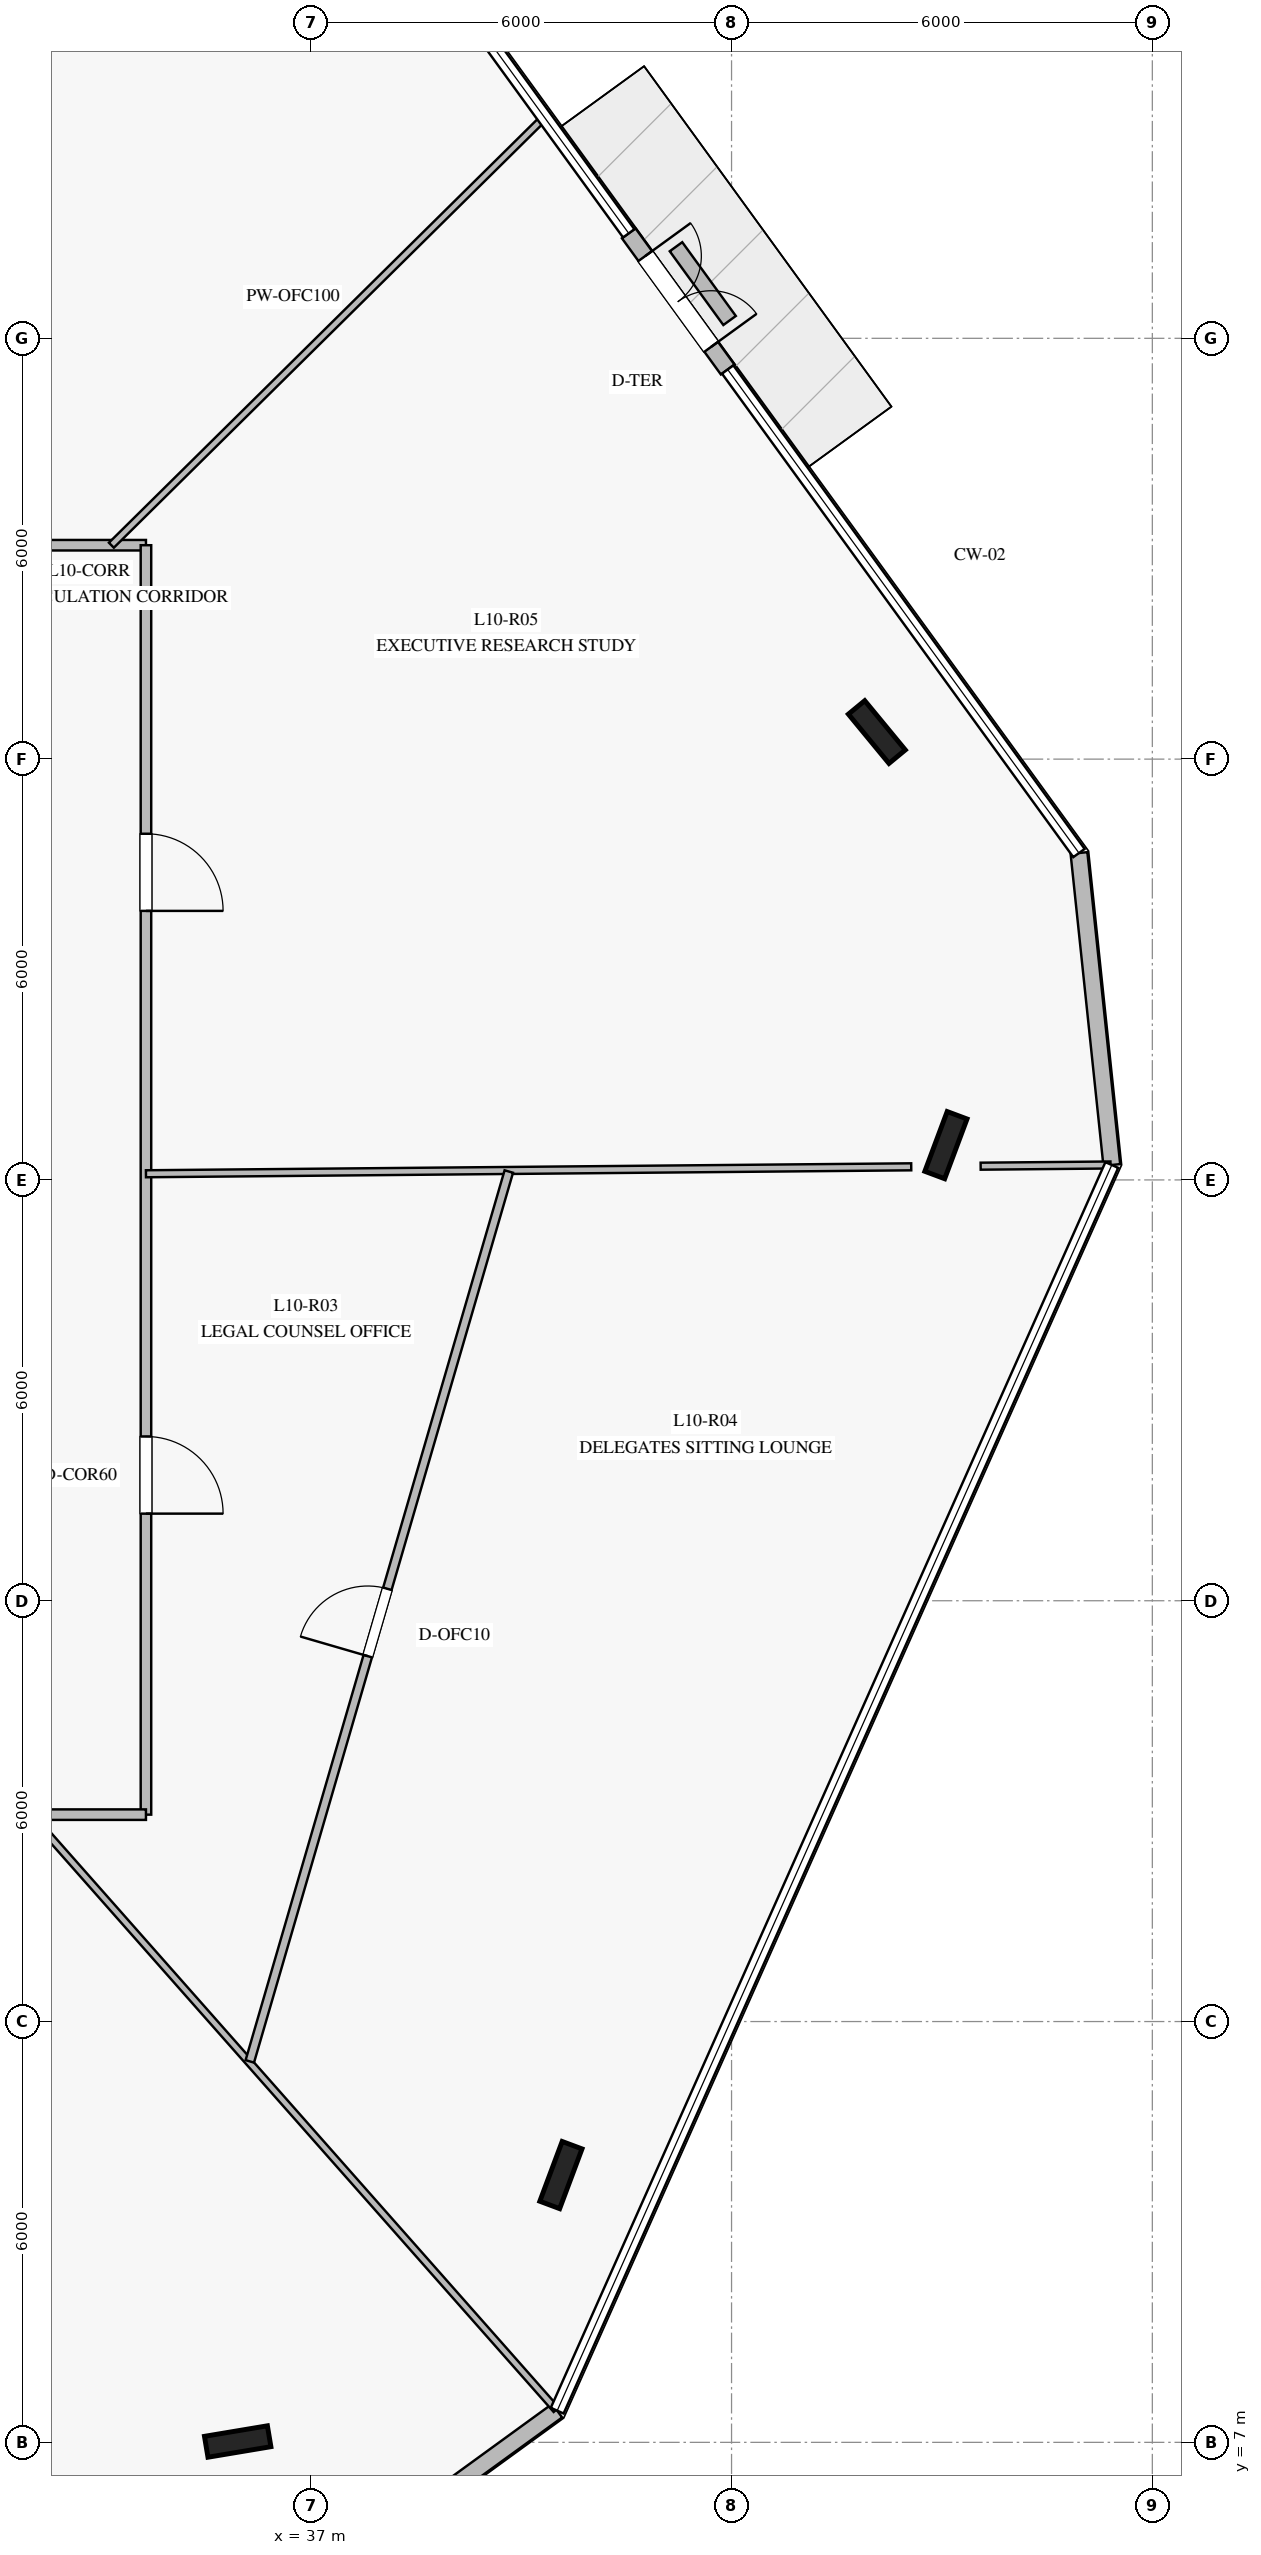
"""IFC4 building model, lengths in metres.
Left out: names, types, materials, properties, quantities, classifications, styles, units other than length and angle.
Written with IfcOpenShell. Run it as: python <this file> out.ifc"""

import sys

from ifc_helpers import new_model, si_unit, direction, frame, frame_2d, origin, origin_2d, place, context, subcontext, project, spatial, rectangle, i_section, extrude, element, fill, save


model = new_model("IFC4")
c1 = context("Model", 3, precision=1e-05, world=origin(), true_north=direction((0.0, 1.0)))
c2 = subcontext(c1, "Body", "Model", "MODEL_VIEW")
j1 = project(units=[si_unit("LENGTHUNIT", "METRE"), si_unit("PLANEANGLEUNIT", "RADIAN")], contexts=[c1])
p1 = place(None, origin())
s1 = spatial("IfcSite", under=j1, at=p1, CompositionType="ELEMENT")
p2 = place(p1, origin())
s2 = spatial("IfcBuilding", under=s1, at=p2, CompositionType="ELEMENT")
p3 = place(p2, frame((0.0, 0.0, 44.0)))
s3 = spatial("IfcBuildingStorey", under=s2, at=p3, CompositionType="ELEMENT", Elevation=44.0)
for number, where, z_axis, x_axis in (
    (1, (45.072, 31.386, 0.0), (0.0, 0.0, 1.0), (-0.636, 0.772, 0.0)),
    (2, (35.958, 7.012, 0.0), (0.0, 0.0, 1.0), (0.986, 0.165, 0.0)),
    (3, (40.567, 10.811, 0.0), (0.0, 0.0, 1.0), (0.35, 0.937, 0.0)),
    (4, (46.057, 25.496, 0.0), (0.0, 0.0, 1.0), (0.35, 0.937, 0.0)),
):
    element("IfcColumn", number, at=place(p3, frame(where, z_axis=z_axis, x_axis=x_axis)), inside=s3, PredefinedType="COLUMN", context=c2, shape_type="SweptSolid", body=[
        extrude(i_section(OverallWidth=0.302, OverallDepth=0.91, WebThickness=0.021, FlangeThickness=0.04, at=origin_2d()), origin(), (0.0, 0.0, 1.0), 4.0),
    ])
p4 = place(p3, frame((42.945, 36.555, 0.0), z_axis=(0.0, 0.0, 1.0), x_axis=(-0.587808827466, 0.808999865484, 0.0)))
e5 = element("IfcWall", 5, at=p4, inside=s3, PredefinedType="STANDARD", context=c2, shape_type="SweptSolid", body=[
    extrude(rectangle(XDim=2.401, YDim=0.24, at=frame_2d((1.2, 0.0))), origin(), (0.0, 0.0, 1.0), 3.76),
])
p5 = place(p4, frame((0.4, 0.0, 0.0)))
e6 = element("IfcOpeningElement", 6, at=p5, cuts=e5, PredefinedType="OPENING", context=c2, shape_type="SweptSolid", body=[
    extrude(rectangle(XDim=1.6, YDim=2.25, at=frame_2d((0.8, 1.125))), frame((0.0, 0.13, 0.0), z_axis=(0.0, -1.0, 0.0), x_axis=(1.0, 0.0, 0.0)), (0.0, 0.0, 1.0), 0.26),
])
p6 = place(p3, frame((36.895, 4.823, 0.0), z_axis=(0.0, 0.0, 1.0), x_axis=(0.80905696026, 0.587730240038, 0.0)))
e7 = element("IfcWall", 7, at=p6, inside=s3, PredefinedType="STANDARD", context=c2, shape_type="SweptSolid", body=[
    extrude(rectangle(XDim=4.473, YDim=0.24, at=frame_2d((2.236, 0.0))), origin(), (0.0, 0.0, 1.0), 3.76),
])
p7 = place(p3, frame((48.422, 25.213, 0.0), z_axis=(0.0, 0.0, 1.0), x_axis=(-0.104642162151, 0.994509938563, 0.0)))
e8 = element("IfcWall", 8, at=p7, inside=s3, PredefinedType="STANDARD", context=c2, shape_type="SweptSolid", body=[
    extrude(rectangle(XDim=4.473, YDim=0.24, at=frame_2d((2.236, 0.0))), origin(), (0.0, 0.0, 1.0), 3.76),
])
p8 = place(p3, frame((42.972, 37.254, 0.0), z_axis=(0.0, 0.0, 1.0), x_axis=(-0.587579763197, 0.809166251076, 0.0)))
e9 = element("IfcWall", 9, at=p8, inside=s3, PredefinedType="USERDEFINED", context=c2, shape_type="SweptSolid", body=[
    extrude(rectangle(XDim=1.3, YDim=0.22, at=frame_2d((0.65, 0.0))), origin(), (0.0, 0.0, 1.0), 0.4),
])
p9 = place(p3, frame((15.35, 34.05, 0.0), z_axis=(0.0, 0.0, 1.0), x_axis=(1.0, 0.0, 0.0)))
e10 = element("IfcWall", 10, at=p9, inside=s3, PredefinedType="PARTITIONING", context=c2, shape_type="SweptSolid", body=[
    extrude(rectangle(XDim=19.3, YDim=0.15, at=frame_2d((9.65, 0.0))), origin(), (0.0, 0.0, 1.0), 3.21),
])
p10 = place(p9, frame((13.94, 0.0, 0.0)))
e11 = element("IfcOpeningElement", 11, at=p10, cuts=e10, PredefinedType="OPENING", context=c2, shape_type="SweptSolid", body=[
    extrude(rectangle(XDim=1.1, YDim=2.2, at=frame_2d((0.55, 1.1))), frame((0.0, 0.085, 0.0), z_axis=(0.0, -1.0, 0.0), x_axis=(1.0, 0.0, 0.0)), (0.0, 0.0, 1.0), 0.17),
])
p11 = place(p9, frame((4.582, 0.0, 0.0)))
e12 = element("IfcOpeningElement", 12, at=p11, cuts=e10, PredefinedType="OPENING", context=c2, shape_type="SweptSolid", body=[
    extrude(rectangle(XDim=1.1, YDim=2.2, at=frame_2d((0.55, 1.1))), frame((0.0, 0.085, 0.0), z_axis=(0.0, -1.0, 0.0), x_axis=(1.0, 0.0, 0.0)), (0.0, 0.0, 1.0), 0.17),
])
p12 = place(p3, frame((34.65, 34.05, 0.0), z_axis=(0.0, 0.0, 1.0), x_axis=(0.0, -1.0, 0.0)))
e13 = element("IfcWall", 13, at=p12, inside=s3, PredefinedType="PARTITIONING", context=c2, shape_type="SweptSolid", body=[
    extrude(rectangle(XDim=18.1, YDim=0.15, at=frame_2d((9.05, 0.0))), origin(), (0.0, 0.0, 1.0), 3.21),
])
p13 = place(p12, frame((12.708, 0.0, 0.0)))
e14 = element("IfcOpeningElement", 14, at=p13, cuts=e13, PredefinedType="OPENING", context=c2, shape_type="SweptSolid", body=[
    extrude(rectangle(XDim=1.1, YDim=2.2, at=frame_2d((0.55, 1.1))), frame((0.0, 0.085, 0.0), z_axis=(0.0, -1.0, 0.0), x_axis=(1.0, 0.0, 0.0)), (0.0, 0.0, 1.0), 0.17),
])
p14 = place(p12, frame((4.114, 0.0, 0.0)))
e15 = element("IfcOpeningElement", 15, at=p14, cuts=e13, PredefinedType="OPENING", context=c2, shape_type="SweptSolid", body=[
    extrude(rectangle(XDim=1.1, YDim=2.2, at=frame_2d((0.55, 1.1))), frame((0.0, 0.085, 0.0), z_axis=(0.0, -1.0, 0.0), x_axis=(1.0, 0.0, 0.0)), (0.0, 0.0, 1.0), 0.17),
])
p15 = place(p3, frame((34.65, 15.95, 0.0), z_axis=(0.0, 0.0, 1.0), x_axis=(-1.0, 0.0, 0.0)))
e16 = element("IfcWall", 16, at=p15, inside=s3, PredefinedType="PARTITIONING", context=c2, shape_type="SweptSolid", body=[
    extrude(rectangle(XDim=19.3, YDim=0.15, at=frame_2d((9.65, 0.0))), origin(), (0.0, 0.0, 1.0), 3.21),
])
p16 = place(p15, frame((15.181, 0.0, 0.0)))
e17 = element("IfcOpeningElement", 17, at=p16, cuts=e16, PredefinedType="OPENING", context=c2, shape_type="SweptSolid", body=[
    extrude(rectangle(XDim=1.1, YDim=2.2, at=frame_2d((0.55, 1.1))), frame((0.0, 0.085, 0.0), z_axis=(0.0, -1.0, 0.0), x_axis=(1.0, 0.0, 0.0)), (0.0, 0.0, 1.0), 0.17),
])
p17 = place(p15, frame((6.497, 0.0, 0.0)))
e18 = element("IfcOpeningElement", 18, at=p17, cuts=e16, PredefinedType="OPENING", context=c2, shape_type="SweptSolid", body=[
    extrude(rectangle(XDim=1.1, YDim=2.2, at=frame_2d((0.55, 1.1))), frame((0.0, 0.085, 0.0), z_axis=(0.0, -1.0, 0.0), x_axis=(1.0, 0.0, 0.0)), (0.0, 0.0, 1.0), 0.17),
])
p18 = place(p3, frame((34.157, 34.05, 0.0), z_axis=(0.0, 0.0, 1.0), x_axis=(0.711265132762, 0.702923830096, 0.0)))
e19 = element("IfcWall", 19, at=p18, inside=s3, PredefinedType="MOVABLE", context=c2, shape_type="SweptSolid", body=[
    extrude(rectangle(XDim=8.664, YDim=0.1, at=frame_2d((4.332, 0.0))), origin(), (0.0, 0.0, 1.0), 3.06),
])
p19 = place(p3, frame((33.001, 15.95, 0.0), z_axis=(0.0, 0.0, 1.0), x_axis=(0.662327291421, -0.749214628153, 0.0)))
e20 = element("IfcWall", 20, at=p19, inside=s3, PredefinedType="MOVABLE", context=c2, shape_type="SweptSolid", body=[
    extrude(rectangle(XDim=11.324, YDim=0.1, at=frame_2d((5.662, 0.0))), origin(), (0.0, 0.0, 1.0), 3.06),
])
p20 = place(p3, frame((34.65, 25.088, 0.0), z_axis=(0.0, 0.0, 1.0), x_axis=(0.999958746777, 0.009083212171, 0.0)))
e21 = element("IfcWall", 21, at=p20, inside=s3, PredefinedType="MOVABLE", context=c2, shape_type="SweptSolid", body=[
    extrude(rectangle(XDim=10.913, YDim=0.1, at=frame_2d((5.456, 0.0))), origin(), (0.0, 0.0, 1.0), 3.76),
])
p21 = place(p3, frame((46.552, 25.196, 0.0), z_axis=(0.0, 0.0, 1.0), x_axis=(0.999958593011, 0.009100124363, 0.0)))
e22 = element("IfcWall", 22, at=p21, inside=s3, PredefinedType="MOVABLE", context=c2, shape_type="SweptSolid", body=[
    extrude(rectangle(XDim=1.851, YDim=0.1, at=frame_2d((0.926, 0.0))), origin(), (0.0, 0.0, 1.0), 3.76),
])
p22 = place(p3, frame((36.131, 12.432, 0.0), z_axis=(0.0, 0.0, 1.0), x_axis=(0.279451559727, 0.960159791788, 0.0)))
e23 = element("IfcWall", 23, at=p22, inside=s3, PredefinedType="PARTITIONING", context=c2, shape_type="SweptSolid", body=[
    extrude(rectangle(XDim=13.215, YDim=0.125, at=frame_2d((6.607, 0.0))), origin(), (0.0, 0.0, 1.0), 3.21),
])
p23 = place(p22, frame((6.018, 0.0, 0.0)))
e24 = element("IfcOpeningElement", 24, at=p23, cuts=e23, PredefinedType="OPENING", context=c2, shape_type="SweptSolid", body=[
    extrude(rectangle(XDim=1.0, YDim=2.15, at=frame_2d((0.5, 1.075))), frame((0.0, 0.073, 0.0), z_axis=(0.0, -1.0, 0.0), x_axis=(1.0, 0.0, 0.0)), (0.0, 0.0, 1.0), 0.145),
])
p24 = place(p5, frame((1.6, 0.0, 0.0), z_axis=(0.0, 0.0, 1.0), x_axis=(-1.0, 0.0, 0.0)))
e25 = element("IfcDoor", 25, at=p24, inside=s3, OperationType="DOUBLE_DOOR_SINGLE_SWING", PredefinedType="DOOR", context=c2, shape_type="SweptSolid", body=[
    extrude(rectangle(XDim=1.6, YDim=2.25, at=frame_2d((0.8, 1.125))), frame((0.0, 0.025, 0.0), z_axis=(0.0, -1.0, 0.0), x_axis=(1.0, 0.0, 0.0)), (0.0, 0.0, 1.0), 0.05),
])
fill(e6, e25)
p25 = place(p13, origin())
e26 = element("IfcDoor", 26, at=p25, inside=s3, OperationType="SINGLE_SWING_RIGHT", PredefinedType="DOOR", context=c2, shape_type="SweptSolid", body=[
    extrude(rectangle(XDim=1.1, YDim=2.2, at=frame_2d((0.55, 1.1))), frame((0.0, 0.025, 0.0), z_axis=(0.0, -1.0, 0.0), x_axis=(1.0, 0.0, 0.0)), (0.0, 0.0, 1.0), 0.05),
])
fill(e14, e26)
p26 = place(p23, origin())
e27 = element("IfcDoor", 27, at=p26, inside=s3, OperationType="SINGLE_SWING_LEFT", PredefinedType="DOOR", context=c2, shape_type="SweptSolid", body=[
    extrude(rectangle(XDim=1.0, YDim=2.15, at=frame_2d((0.5, 1.075))), frame((0.0, 0.025, 0.0), z_axis=(0.0, -1.0, 0.0), x_axis=(1.0, 0.0, 0.0)), (0.0, 0.0, 1.0), 0.05),
])
fill(e24, e27)
p27 = place(p14, origin())
e28 = element("IfcDoor", 28, at=p27, inside=s3, OperationType="SINGLE_SWING_RIGHT", PredefinedType="DOOR", context=c2, shape_type="SweptSolid", body=[
    extrude(rectangle(XDim=1.1, YDim=2.2, at=frame_2d((0.55, 1.1))), frame((0.0, 0.025, 0.0), z_axis=(0.0, -1.0, 0.0), x_axis=(1.0, 0.0, 0.0)), (0.0, 0.0, 1.0), 0.05),
])
fill(e15, e28)
save(model, sys.argv[1])
